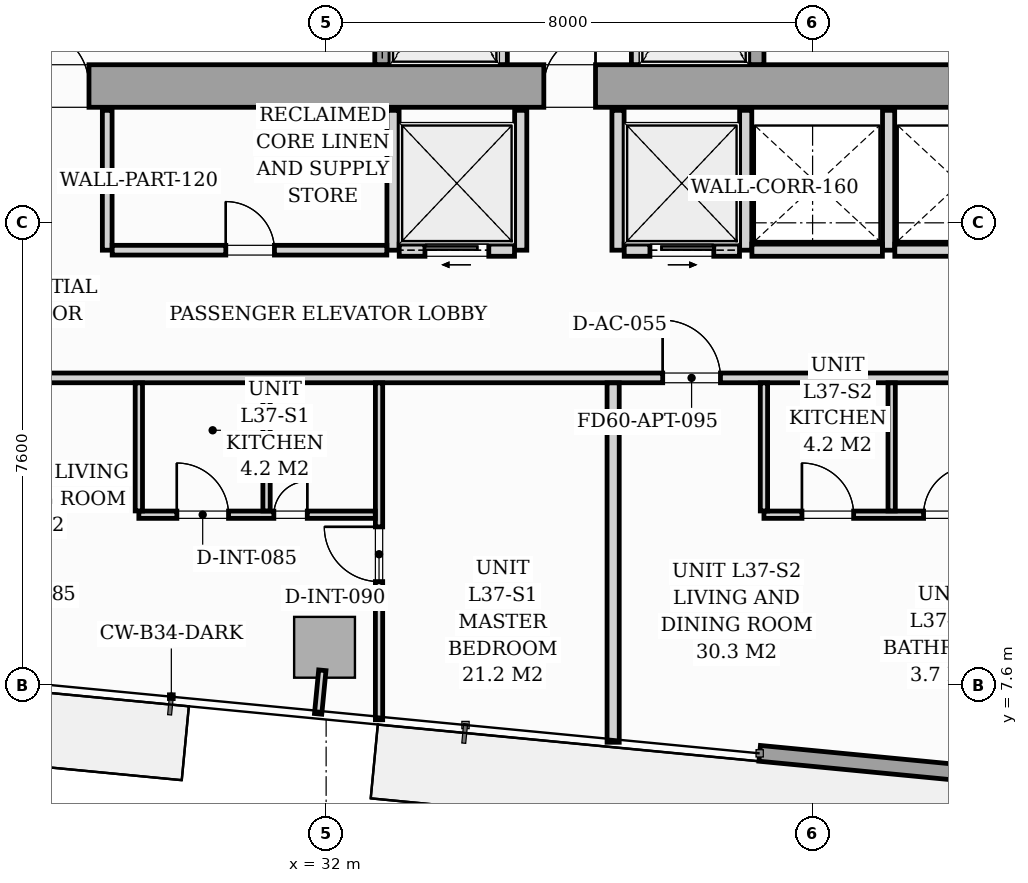
"""IFC4 building model, lengths in metres.
Left out: names, types, materials, properties, quantities, classifications, styles, units other than length and angle.
Written with IfcOpenShell. Run it as: python <this file> out.ifc"""

import sys

from ifc_helpers import new_model, si_unit, direction, frame, frame_2d, origin, origin_2d, place, context, subcontext, project, spatial, rectangle, i_section, extrude, source, transform, mapped, element, fill, save


model = new_model("IFC4")
c1 = context("Model", 3, precision=1e-05, world=origin(), true_north=direction((0.0, 1.0)))
c2 = subcontext(c1, "Body", "Model", "MODEL_VIEW")
j1 = project(units=[si_unit("LENGTHUNIT", "METRE"), si_unit("PLANEANGLEUNIT", "RADIAN")], contexts=[c1])
p1 = place(None, origin())
s1 = spatial("IfcSite", under=j1, at=p1, CompositionType="ELEMENT")
p2 = place(p1, origin())
s2 = spatial("IfcBuilding", under=s1, at=p2, CompositionType="ELEMENT")
p3 = place(p2, frame((0.0, 0.0, 131.0)))
s3 = spatial("IfcBuildingStorey", under=s2, at=p3, CompositionType="ELEMENT", Elevation=131.0)
m1 = source(origin(), c2, "Body", "SweptSolid", [
    extrude(i_section(OverallWidth=0.421, OverallDepth=0.465, WebThickness=0.045, FlangeThickness=0.073, FilletRadius=0.018, at=origin_2d()), origin(), (0.0, 0.0, 1.0), 3.196),
])
for number, where, z_axis, x_axis in (
    (1, (33.12, 17.4, 0.002), (0.0, 0.0, 1.0), (1.0, 0.0, 0.0)),
    (2, (38.88, 17.4, 0.002), (0.0, 0.0, 1.0), (1.0, 0.0, 0.0)),
):
    element("IfcColumn", number, at=place(p3, frame(where, z_axis=z_axis, x_axis=x_axis)), inside=s3, PredefinedType="PILASTER", context=c2, shape_type="MappedRepresentation", body=[
        mapped(m1, transform((0.0, 0.0, 0.0), scale=1.0)),
    ])
m2 = source(origin(), c2, "Body", "SweptSolid", [
    extrude(rectangle(XDim=1.0, YDim=1.0, at=origin_2d()), origin(), (0.0, 0.0, 1.0), 3.196),
])
p4 = place(p3, frame((31.974, 8.22, 0.002), z_axis=(0.0, 0.0, 1.0), x_axis=(0.995396198367, -0.09584575252, 0.0)))
e3 = element("IfcColumn", 3, at=p4, inside=s3, PredefinedType="COLUMN", context=c2, shape_type="MappedRepresentation", body=[
    mapped(m2, transform((0.0, 0.0, 0.0), scale=1.0)),
])
p5 = place(p3, frame((56.061, 4.845, 0.0), z_axis=(0.0, 0.0, 1.0), x_axis=(-0.995395976631, 0.095848055311, 0.0)))
e4 = element("IfcWall", 4, at=p5, inside=s3, PredefinedType="STANDARD", context=c2, shape_type="SweptSolid", body=[
    extrude(rectangle(XDim=17.01, YDim=0.26, at=frame_2d((8.505, 0.0))), origin(), (0.0, 0.0, 1.0), 2.94),
])
p6 = place(p5, frame((7.999, 0.0, 0.0)))
e5 = element("IfcOpeningElement", 5, at=p6, cuts=e4, PredefinedType="OPENING", context=c2, shape_type="SweptSolid", body=[
    extrude(rectangle(XDim=1.8, YDim=2.06, at=frame_2d((0.9, 1.03))), frame((0.0, 0.14, 0.0), z_axis=(0.0, -1.0, 0.0), x_axis=(1.0, 0.0, 0.0)), (0.0, 0.0, 1.0), 0.28),
])
p7 = place(p5, frame((2.05, 0.0, 0.65)))
e6 = element("IfcOpeningElement", 6, at=p7, cuts=e4, PredefinedType="OPENING", context=c2, shape_type="SweptSolid", body=[
    extrude(rectangle(XDim=1.6, YDim=1.5, at=frame_2d((0.8, 0.75))), frame((0.0, 0.14, 0.0), z_axis=(0.0, -1.0, 0.0), x_axis=(1.0, 0.0, 0.0)), (0.0, 0.0, 1.0), 0.28),
])
p8 = place(p5, frame((10.852, 0.0, 0.75)))
e7 = element("IfcOpeningElement", 7, at=p8, cuts=e4, PredefinedType="OPENING", context=c2, shape_type="SweptSolid", body=[
    extrude(rectangle(XDim=1.6, YDim=1.5, at=frame_2d((0.8, 0.75))), frame((0.0, 0.14, 0.0), z_axis=(0.0, -1.0, 0.0), x_axis=(1.0, 0.0, 0.0)), (0.0, 0.0, 1.0), 0.28),
])
p9 = place(p3, frame((26.1, 17.45, 0.0), z_axis=(0.0, 0.0, 1.0), x_axis=(1.0, 0.0, 0.0)))
e8 = element("IfcWall", 8, at=p9, inside=s3, PredefinedType="SHEAR", context=c2, shape_type="SweptSolid", body=[
    extrude(rectangle(XDim=19.8, YDim=0.7, at=frame_2d((9.9, 0.0))), origin(), (0.0, 0.0, 1.0), 3.2),
])
p10 = place(p9, frame((1.05, 0.0, 0.0)))
e9 = element("IfcOpeningElement", 9, at=p10, cuts=e8, PredefinedType="OPENING", context=c2, shape_type="SweptSolid", body=[
    extrude(rectangle(XDim=0.95, YDim=2.06, at=frame_2d((0.475, 1.03))), frame((0.0, 0.36, 0.0), z_axis=(0.0, -1.0, 0.0), x_axis=(1.0, 0.0, 0.0)), (0.0, 0.0, 1.0), 0.72),
])
p11 = place(p9, frame((9.48, 0.0, 0.0)))
e10 = element("IfcOpeningElement", 10, at=p11, cuts=e8, PredefinedType="OPENING", context=c2, shape_type="SweptSolid", body=[
    extrude(rectangle(XDim=0.85, YDim=2.0, at=frame_2d((0.425, 1.0))), frame((0.0, 0.36, 0.0), z_axis=(0.0, -1.0, 0.0), x_axis=(1.0, 0.0, 0.0)), (0.0, 0.0, 1.0), 0.72),
])
p12 = place(p9, frame((17.65, 0.0, 0.0)))
e11 = element("IfcOpeningElement", 11, at=p12, cuts=e8, PredefinedType="OPENING", context=c2, shape_type="SweptSolid", body=[
    extrude(rectangle(XDim=0.95, YDim=2.06, at=frame_2d((0.475, 1.03))), frame((0.0, 0.36, 0.0), z_axis=(0.0, -1.0, 0.0), x_axis=(1.0, 0.0, 0.0)), (0.0, 0.0, 1.0), 0.72),
])
p13 = place(p3, frame((32.925, 17.802, 0.0), z_axis=(0.0, 0.0, 1.0), x_axis=(0.0, 1.0, 0.0)))
e12 = element("IfcWall", 12, at=p13, inside=s3, PredefinedType="SOLIDWALL", context=c2, shape_type="SweptSolid", body=[
    extrude(rectangle(XDim=2.646, YDim=0.25, at=frame_2d((1.323, 0.0))), origin(), (0.0, 0.0, 1.0), 3.2),
])
p14 = place(p13, frame((0.598, 0.0, 0.0)))
e13 = element("IfcOpeningElement", 13, at=p14, cuts=e12, PredefinedType="OPENING", context=c2, shape_type="SweptSolid", body=[
    extrude(rectangle(XDim=1.1, YDim=2.08, at=frame_2d((0.55, 1.04))), frame((0.0, 0.135, 0.0), z_axis=(0.0, -1.0, 0.0), x_axis=(1.0, 0.0, 0.0)), (0.0, 0.0, 1.0), 0.27),
])
for number, where, z_axis, x_axis in (
    (14, (34.9, 17.802, 0.0), (0.0, 0.0, 1.0), (0.0, 1.0, 0.0)),
    (15, (37.1, 17.802, 0.0), (0.0, 0.0, 1.0), (0.0, 1.0, 0.0)),
):
    element("IfcWall", number, at=place(p3, frame(where, z_axis=z_axis, x_axis=x_axis)), inside=s3, PredefinedType="PARTITIONING", context=c2, shape_type="SweptSolid", body=[
        extrude(rectangle(XDim=2.646, YDim=0.16, at=frame_2d((1.323, 0.0))), origin(), (0.0, 0.0, 1.0), 2.94),
    ])
p15 = place(p3, frame((39.075, 17.802, 0.0), z_axis=(0.0, 0.0, 1.0), x_axis=(0.0, 1.0, 0.0)))
e16 = element("IfcWall", 16, at=p15, inside=s3, PredefinedType="SOLIDWALL", context=c2, shape_type="SweptSolid", body=[
    extrude(rectangle(XDim=2.646, YDim=0.25, at=frame_2d((1.323, 0.0))), origin(), (0.0, 0.0, 1.0), 3.2),
])
p16 = place(p15, frame((0.598, 0.0, 0.0)))
e17 = element("IfcOpeningElement", 17, at=p16, cuts=e16, PredefinedType="OPENING", context=c2, shape_type="SweptSolid", body=[
    extrude(rectangle(XDim=1.1, YDim=2.08, at=frame_2d((0.55, 1.04))), frame((0.0, 0.135, 0.0), z_axis=(0.0, -1.0, 0.0), x_axis=(1.0, 0.0, 0.0)), (0.0, 0.0, 1.0), 0.27),
])
p17 = place(p3, frame((28.4, 14.75, 0.0), z_axis=(0.0, 0.0, 1.0), x_axis=(0.0, 1.0, 0.0)))
e18 = element("IfcWall", 18, at=p17, inside=s3, PredefinedType="PARTITIONING", context=c2, shape_type="SweptSolid", body=[
    extrude(rectangle(XDim=2.3, YDim=0.16, at=frame_2d((1.15, 0.0))), origin(), (0.0, 0.0, 1.0), 2.94),
])
p18 = place(p3, frame((33.1, 14.75, 0.0), z_axis=(0.0, 0.0, 1.0), x_axis=(0.0, 1.0, 0.0)))
e19 = element("IfcWall", 19, at=p18, inside=s3, PredefinedType="PARTITIONING", context=c2, shape_type="SweptSolid", body=[
    extrude(rectangle(XDim=2.3, YDim=0.2, at=frame_2d((1.15, 0.0))), origin(), (0.0, 0.0, 1.0), 2.94),
])
p19 = place(p3, frame((28.482, 14.75, 0.0), z_axis=(0.0, 0.0, 1.0), x_axis=(1.0, 0.0, 0.0)))
e20 = element("IfcWall", 20, at=p19, inside=s3, PredefinedType="PARTITIONING", context=c2, shape_type="SweptSolid", body=[
    extrude(rectangle(XDim=4.516, YDim=0.16, at=frame_2d((2.258, 0.0))), origin(), (0.0, 0.0, 1.0), 2.94),
])
p20 = place(p19, frame((1.868, 0.0, 0.0)))
e21 = element("IfcOpeningElement", 21, at=p20, cuts=e20, PredefinedType="OPENING", context=c2, shape_type="SweptSolid", body=[
    extrude(rectangle(XDim=0.8, YDim=2.05, at=frame_2d((0.4, 1.025))), frame((0.0, 0.09, 0.0), z_axis=(0.0, -1.0, 0.0), x_axis=(1.0, 0.0, 0.0)), (0.0, 0.0, 1.0), 0.18),
])
p21 = place(p3, frame((35.2, 14.75, 0.0), z_axis=(0.0, 0.0, 1.0), x_axis=(0.0, 1.0, 0.0)))
e22 = element("IfcWall", 22, at=p21, inside=s3, PredefinedType="PARTITIONING", context=c2, shape_type="SweptSolid", body=[
    extrude(rectangle(XDim=2.3, YDim=0.2, at=frame_2d((1.15, 0.0))), origin(), (0.0, 0.0, 1.0), 2.94),
])
p22 = place(p3, frame((33.202, 14.75, 0.0), z_axis=(0.0, 0.0, 1.0), x_axis=(1.0, 0.0, 0.0)))
e23 = element("IfcWall", 23, at=p22, inside=s3, PredefinedType="PARTITIONING", context=c2, shape_type="SweptSolid", body=[
    extrude(rectangle(XDim=1.896, YDim=0.2, at=frame_2d((0.948, 0.0))), origin(), (0.0, 0.0, 1.0), 2.94),
])
p23 = place(p22, frame((0.423, 0.0, 0.0)))
e24 = element("IfcOpeningElement", 24, at=p23, cuts=e23, PredefinedType="OPENING", context=c2, shape_type="SweptSolid", body=[
    extrude(rectangle(XDim=1.05, YDim=2.08, at=frame_2d((0.525, 1.04))), frame((0.0, 0.11, 0.0), z_axis=(0.0, -1.0, 0.0), x_axis=(1.0, 0.0, 0.0)), (0.0, 0.0, 1.0), 0.22),
])
for number, where, z_axis, x_axis in (
    (25, (36.8, 14.75, 0.0), (0.0, 0.0, 1.0), (0.0, 1.0, 0.0)),
    (26, (38.9, 14.75, 0.0), (0.0, 0.0, 1.0), (0.0, 1.0, 0.0)),
):
    element("IfcWall", number, at=place(p3, frame(where, z_axis=z_axis, x_axis=x_axis)), inside=s3, PredefinedType="PARTITIONING", context=c2, shape_type="SweptSolid", body=[
        extrude(rectangle(XDim=2.3, YDim=0.2, at=frame_2d((1.15, 0.0))), origin(), (0.0, 0.0, 1.0), 2.94),
    ])
p24 = place(p3, frame((36.902, 14.75, 0.0), z_axis=(0.0, 0.0, 1.0), x_axis=(1.0, 0.0, 0.0)))
e27 = element("IfcWall", 27, at=p24, inside=s3, PredefinedType="PARTITIONING", context=c2, shape_type="SweptSolid", body=[
    extrude(rectangle(XDim=1.896, YDim=0.2, at=frame_2d((0.948, 0.0))), origin(), (0.0, 0.0, 1.0), 2.94),
])
p25 = place(p24, frame((0.423, 0.0, 0.0)))
e28 = element("IfcOpeningElement", 28, at=p25, cuts=e27, PredefinedType="OPENING", context=c2, shape_type="SweptSolid", body=[
    extrude(rectangle(XDim=1.05, YDim=2.08, at=frame_2d((0.525, 1.04))), frame((0.0, 0.11, 0.0), z_axis=(0.0, -1.0, 0.0), x_axis=(1.0, 0.0, 0.0)), (0.0, 0.0, 1.0), 0.22),
])
p26 = place(p3, frame((41.25, 14.75, 0.0), z_axis=(0.0, 0.0, 1.0), x_axis=(0.0, 1.0, 0.0)))
e29 = element("IfcWall", 29, at=p26, inside=s3, PredefinedType="PARTITIONING", context=c2, shape_type="SweptSolid", body=[
    extrude(rectangle(XDim=2.3, YDim=0.2, at=frame_2d((1.15, 0.0))), origin(), (0.0, 0.0, 1.0), 2.94),
])
for number, where, z_axis, x_axis in (
    (30, (39.002, 14.75, 0.0), (0.0, 0.0, 1.0), (1.0, 0.0, 0.0)),
    (31, (41.352, 14.75, 0.0), (0.0, 0.0, 1.0), (1.0, 0.0, 0.0)),
):
    element("IfcWall", number, at=place(p3, frame(where, z_axis=z_axis, x_axis=x_axis)), inside=s3, PredefinedType="PARTITIONING", context=c2, shape_type="SweptSolid", body=[
        extrude(rectangle(XDim=2.146, YDim=0.2, at=frame_2d((1.073, 0.0))), origin(), (0.0, 0.0, 1.0), 2.94),
    ])
p27 = place(p3, frame((22.05, 12.65, 0.0), z_axis=(0.0, 0.0, 1.0), x_axis=(1.0, 0.0, 0.0)))
e32 = element("IfcWall", 32, at=p27, inside=s3, PredefinedType="PARTITIONING", context=c2, shape_type="SweptSolid", body=[
    extrude(rectangle(XDim=23.83, YDim=0.16, at=frame_2d((11.915, 0.0))), origin(), (0.0, 0.0, 1.0), 2.94),
])
p28 = place(p27, frame((3.0, 0.0, 0.0)))
e33 = element("IfcOpeningElement", 33, at=p28, cuts=e32, PredefinedType="OPENING", context=c2, shape_type="SweptSolid", body=[
    extrude(rectangle(XDim=0.95, YDim=2.06, at=frame_2d((0.475, 1.03))), frame((0.0, 0.09, 0.0), z_axis=(0.0, -1.0, 0.0), x_axis=(1.0, 0.0, 0.0)), (0.0, 0.0, 1.0), 0.18),
])
p29 = place(p27, frame((15.485, 0.0, 0.0)))
e34 = element("IfcOpeningElement", 34, at=p29, cuts=e32, PredefinedType="OPENING", context=c2, shape_type="SweptSolid", body=[
    extrude(rectangle(XDim=0.95, YDim=2.06, at=frame_2d((0.475, 1.03))), frame((0.0, 0.09, 0.0), z_axis=(0.0, -1.0, 0.0), x_axis=(1.0, 0.0, 0.0)), (0.0, 0.0, 1.0), 0.18),
])
p30 = place(p3, frame((32.87, 7.028, 0.0), z_axis=(0.0, 0.0, 1.0), x_axis=(0.0, 1.0, 0.0)))
e35 = element("IfcWall", 35, at=p30, inside=s3, PredefinedType="PARTITIONING", context=c2, shape_type="SweptSolid", body=[
    extrude(rectangle(XDim=5.54, YDim=0.12, at=frame_2d((2.77, 0.0))), origin(), (0.0, 0.0, 1.0), 2.94),
])
p31 = place(p30, frame((2.272, 0.0, 0.0)))
e36 = element("IfcOpeningElement", 36, at=p31, cuts=e35, PredefinedType="OPENING", context=c2, shape_type="SweptSolid", body=[
    extrude(rectangle(XDim=0.9, YDim=2.05, at=frame_2d((0.45, 1.025))), frame((0.0, 0.07, 0.0), z_axis=(0.0, -1.0, 0.0), x_axis=(1.0, 0.0, 0.0)), (0.0, 0.0, 1.0), 0.14),
])
p32 = place(p3, frame((28.92, 10.4, 0.0), z_axis=(0.0, 0.0, 1.0), x_axis=(1.0, 0.0, 0.0)))
e37 = element("IfcWall", 37, at=p32, inside=s3, PredefinedType="PARTITIONING", context=c2, shape_type="SweptSolid", body=[
    extrude(rectangle(XDim=3.888, YDim=0.12, at=frame_2d((1.944, 0.0))), origin(), (0.0, 0.0, 1.0), 2.94),
])
p33 = place(p32, frame((0.625, 0.0, 0.0)))
e38 = element("IfcOpeningElement", 38, at=p33, cuts=e37, PredefinedType="OPENING", context=c2, shape_type="SweptSolid", body=[
    extrude(rectangle(XDim=0.85, YDim=2.05, at=frame_2d((0.425, 1.025))), frame((0.0, 0.07, 0.0), z_axis=(0.0, -1.0, 0.0), x_axis=(1.0, 0.0, 0.0)), (0.0, 0.0, 1.0), 0.14),
])
p34 = place(p32, frame((2.22, 0.0, 0.0)))
e39 = element("IfcOpeningElement", 39, at=p34, cuts=e37, PredefinedType="OPENING", context=c2, shape_type="SweptSolid", body=[
    extrude(rectangle(XDim=0.55, YDim=2.0, at=frame_2d((0.275, 1.0))), frame((0.0, 0.07, 0.0), z_axis=(0.0, -1.0, 0.0), x_axis=(1.0, 0.0, 0.0)), (0.0, 0.0, 1.0), 0.14),
])
for number, where, z_axis, x_axis in (
    (40, (31.02, 10.462, 0.0), (0.0, 0.0, 1.0), (0.0, 1.0, 0.0)),
    (41, (28.92, 10.462, 0.0), (0.0, 0.0, 1.0), (0.0, 1.0, 0.0)),
):
    element("IfcWall", number, at=place(p3, frame(where, z_axis=z_axis, x_axis=x_axis)), inside=s3, PredefinedType="PARTITIONING", context=c2, shape_type="SweptSolid", body=[
        extrude(rectangle(XDim=2.106, YDim=0.12, at=frame_2d((1.053, 0.0))), origin(), (0.0, 0.0, 1.0), 2.94),
    ])
p35 = place(p3, frame((36.72, 6.658, 0.0), z_axis=(0.0, 0.0, 1.0), x_axis=(0.0, 1.0, 0.0)))
e42 = element("IfcWall", 42, at=p35, inside=s3, PredefinedType="PARTITIONING", context=c2, shape_type="SweptSolid", body=[
    extrude(rectangle(XDim=5.91, YDim=0.2, at=frame_2d((2.955, 0.0))), origin(), (0.0, 0.0, 1.0), 2.94),
])
p36 = place(p3, frame((39.2, 10.4, 0.0), z_axis=(0.0, 0.0, 1.0), x_axis=(1.0, 0.0, 0.0)))
e43 = element("IfcWall", 43, at=p36, inside=s3, PredefinedType="PARTITIONING", context=c2, shape_type="SweptSolid", body=[
    extrude(rectangle(XDim=3.888, YDim=0.12, at=frame_2d((1.944, 0.0))), origin(), (0.0, 0.0, 1.0), 2.94),
])
p37 = place(p36, frame((0.625, 0.0, 0.0)))
e44 = element("IfcOpeningElement", 44, at=p37, cuts=e43, PredefinedType="OPENING", context=c2, shape_type="SweptSolid", body=[
    extrude(rectangle(XDim=0.85, YDim=2.05, at=frame_2d((0.425, 1.025))), frame((0.0, 0.07, 0.0), z_axis=(0.0, -1.0, 0.0), x_axis=(1.0, 0.0, 0.0)), (0.0, 0.0, 1.0), 0.14),
])
p38 = place(p36, frame((2.625, 0.0, 0.0)))
e45 = element("IfcOpeningElement", 45, at=p38, cuts=e43, PredefinedType="OPENING", context=c2, shape_type="SweptSolid", body=[
    extrude(rectangle(XDim=0.8, YDim=2.02, at=frame_2d((0.4, 1.01))), frame((0.0, 0.07, 0.0), z_axis=(0.0, -1.0, 0.0), x_axis=(1.0, 0.0, 0.0)), (0.0, 0.0, 1.0), 0.14),
])
for number, where, z_axis, x_axis in (
    (46, (41.3, 10.462, 0.0), (0.0, 0.0, 1.0), (0.0, 1.0, 0.0)),
    (47, (39.2, 10.462, 0.0), (0.0, 0.0, 1.0), (0.0, 1.0, 0.0)),
):
    element("IfcWall", number, at=place(p3, frame(where, z_axis=z_axis, x_axis=x_axis)), inside=s3, PredefinedType="PARTITIONING", context=c2, shape_type="SweptSolid", body=[
        extrude(rectangle(XDim=2.106, YDim=0.12, at=frame_2d((1.053, 0.0))), origin(), (0.0, 0.0, 1.0), 2.94),
    ])
p39 = place(p3, frame((31.938, 7.841, 0.0), z_axis=(0.0, 0.0, 1.0), x_axis=(-0.095977354523, -0.995383517755, 0.0)))
e48 = element("IfcWall", 48, at=p39, inside=s3, PredefinedType="PARTITIONING", context=c2, shape_type="SweptSolid", body=[
    extrude(rectangle(XDim=0.72, YDim=0.12, at=frame_2d((0.36, 0.0))), origin(), (0.0, 0.0, 1.0), 2.94),
])
m3 = source(origin(), c2, "Body", "SweptSolid", [
    extrude(rectangle(XDim=0.95, YDim=2.06, at=frame_2d((0.475, 1.03))), frame((0.0, 0.025, 0.0), z_axis=(0.0, -1.0, 0.0), x_axis=(1.0, 0.0, 0.0)), (0.0, 0.0, 1.0), 0.05),
])
p40 = place(p10, origin())
e49 = element("IfcDoor", 49, at=p40, inside=s3, OperationType="SINGLE_SWING_LEFT", PredefinedType="DOOR", context=c2, shape_type="MappedRepresentation", body=[
    mapped(m3, transform((0.0, 0.0, 0.0), scale=1.0)),
])
fill(e9, e49)
m4 = source(origin(), c2, "Body", "SweptSolid", [
    extrude(rectangle(XDim=0.85, YDim=2.0, at=frame_2d((0.425, 1.0))), frame((0.0, 0.025, 0.0), z_axis=(0.0, -1.0, 0.0), x_axis=(1.0, 0.0, 0.0)), (0.0, 0.0, 1.0), 0.05),
])
p41 = place(p11, origin())
e50 = element("IfcDoor", 50, at=p41, inside=s3, OperationType="SINGLE_SWING_RIGHT", PredefinedType="DOOR", context=c2, shape_type="MappedRepresentation", body=[
    mapped(m4, transform((0.0, 0.0, 0.0), scale=1.0)),
])
fill(e10, e50)
m5 = source(origin(), c2, "Body", "SweptSolid", [
    extrude(rectangle(XDim=0.8, YDim=2.05, at=frame_2d((0.4, 1.025))), frame((0.0, 0.025, 0.0), z_axis=(0.0, -1.0, 0.0), x_axis=(1.0, 0.0, 0.0)), (0.0, 0.0, 1.0), 0.05),
])
p42 = place(p20, origin())
e51 = element("IfcDoor", 51, at=p42, inside=s3, OperationType="SINGLE_SWING_LEFT", PredefinedType="DOOR", context=c2, shape_type="MappedRepresentation", body=[
    mapped(m5, transform((0.0, 0.0, 0.0), scale=1.0)),
])
fill(e21, e51)
m6 = source(origin(), c2, "Body", "SweptSolid", [
    extrude(rectangle(XDim=1.05, YDim=2.08, at=frame_2d((0.525, 1.04))), frame((0.0, 0.025, 0.0), z_axis=(0.0, -1.0, 0.0), x_axis=(1.0, 0.0, 0.0)), (0.0, 0.0, 1.0), 0.05),
])
p43 = place(p23, origin())
e52 = element("IfcDoor", 52, at=p43, inside=s3, OperationType="SLIDING_TO_LEFT", PredefinedType="DOOR", context=c2, shape_type="MappedRepresentation", body=[
    mapped(m6, transform((0.0, 0.0, 0.0), scale=1.0)),
])
fill(e24, e52)
p44 = place(p25, origin())
e53 = element("IfcDoor", 53, at=p44, inside=s3, OperationType="SLIDING_TO_RIGHT", PredefinedType="DOOR", context=c2, shape_type="MappedRepresentation", body=[
    mapped(m6, transform((0.0, 0.0, 0.0), scale=1.0)),
])
fill(e28, e53)
m7 = source(origin(), c2, "Body", "SweptSolid", [
    extrude(rectangle(XDim=0.9, YDim=2.05, at=frame_2d((0.45, 1.025))), frame((0.0, 0.025, 0.0), z_axis=(0.0, -1.0, 0.0), x_axis=(1.0, 0.0, 0.0)), (0.0, 0.0, 1.0), 0.05),
])
p45 = place(p31, origin())
e54 = element("IfcDoor", 54, at=p45, inside=s3, OperationType="SINGLE_SWING_RIGHT", PredefinedType="DOOR", context=c2, shape_type="MappedRepresentation", body=[
    mapped(m7, transform((0.0, 0.0, 0.0), scale=1.0)),
])
fill(e36, e54)
m8 = source(origin(), c2, "Body", "SweptSolid", [
    extrude(rectangle(XDim=0.85, YDim=2.05, at=frame_2d((0.425, 1.025))), frame((0.0, 0.025, 0.0), z_axis=(0.0, -1.0, 0.0), x_axis=(1.0, 0.0, 0.0)), (0.0, 0.0, 1.0), 0.05),
])
p46 = place(p33, origin())
e55 = element("IfcDoor", 55, at=p46, inside=s3, OperationType="SINGLE_SWING_LEFT", PredefinedType="DOOR", context=c2, shape_type="MappedRepresentation", body=[
    mapped(m8, transform((0.0, 0.0, 0.0), scale=1.0)),
])
fill(e38, e55)
m9 = source(origin(), c2, "Body", "SweptSolid", [
    extrude(rectangle(XDim=0.55, YDim=2.0, at=frame_2d((0.275, 1.0))), frame((0.0, 0.025, 0.0), z_axis=(0.0, -1.0, 0.0), x_axis=(1.0, 0.0, 0.0)), (0.0, 0.0, 1.0), 0.05),
])
p47 = place(p34, origin())
e56 = element("IfcDoor", 56, at=p47, inside=s3, OperationType="SINGLE_SWING_RIGHT", PredefinedType="DOOR", context=c2, shape_type="MappedRepresentation", body=[
    mapped(m9, transform((0.0, 0.0, 0.0), scale=1.0)),
])
fill(e39, e56)
m10 = source(origin(), c2, "Body", "SweptSolid", [
    extrude(rectangle(XDim=0.95, YDim=2.06, at=frame_2d((0.475, 1.03))), frame((0.0, 0.025, 0.0), z_axis=(0.0, -1.0, 0.0), x_axis=(1.0, 0.0, 0.0)), (0.0, 0.0, 1.0), 0.05),
])
p48 = place(p29, origin())
e57 = element("IfcDoor", 57, at=p48, inside=s3, OperationType="SINGLE_SWING_LEFT", PredefinedType="DOOR", context=c2, shape_type="MappedRepresentation", body=[
    mapped(m10, transform((0.0, 0.0, 0.0), scale=1.0)),
])
fill(e34, e57)
p49 = place(p37, origin())
e58 = element("IfcDoor", 58, at=p49, inside=s3, OperationType="SINGLE_SWING_LEFT", PredefinedType="DOOR", context=c2, shape_type="MappedRepresentation", body=[
    mapped(m8, transform((0.0, 0.0, 0.0), scale=1.0)),
])
fill(e44, e58)
m11 = source(origin(), c2, "Body", "SweptSolid", [
    extrude(rectangle(XDim=0.8, YDim=2.02, at=frame_2d((0.4, 1.01))), frame((0.0, 0.025, 0.0), z_axis=(0.0, -1.0, 0.0), x_axis=(1.0, 0.0, 0.0)), (0.0, 0.0, 1.0), 0.05),
])
p50 = place(p38, origin())
e59 = element("IfcDoor", 59, at=p50, inside=s3, OperationType="SINGLE_SWING_RIGHT", PredefinedType="DOOR", context=c2, shape_type="MappedRepresentation", body=[
    mapped(m11, transform((0.0, 0.0, 0.0), scale=1.0)),
])
fill(e45, e59)
save(model, sys.argv[1])
